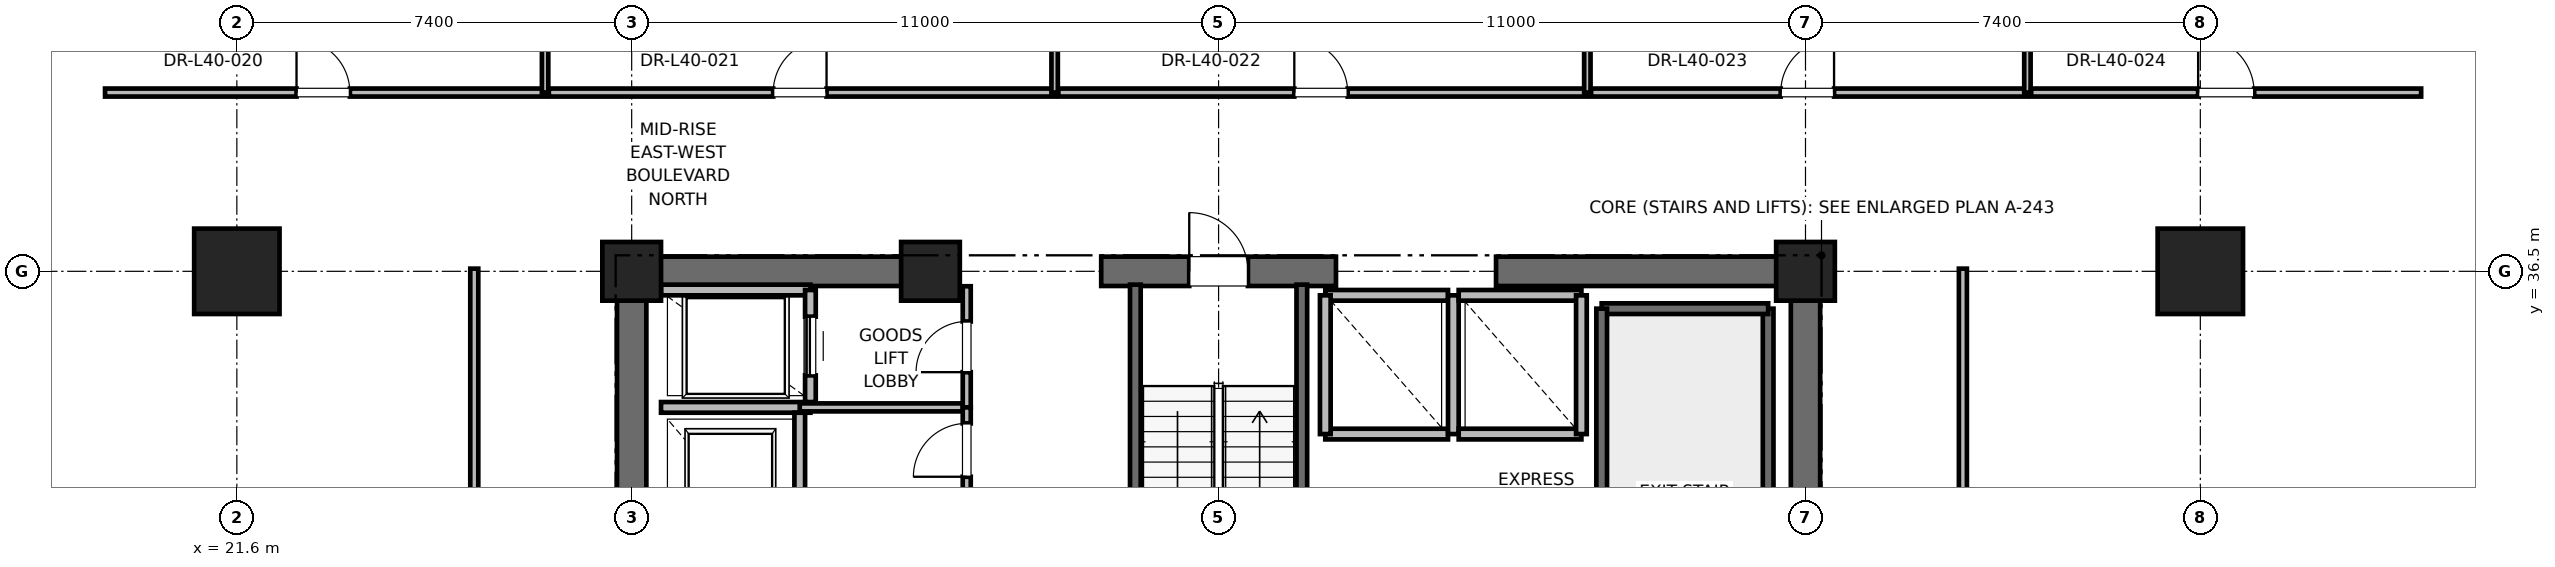
"""IFC4 building model, lengths in metres.
Left out: names, types, materials, properties, quantities, classifications, styles, units other than length and angle.
Written with IfcOpenShell. Run it as: python <this file> out.ifc"""

import sys

from ifc_helpers import new_model, si_unit, direction, frame, frame_2d, origin, origin_2d, place, context, subcontext, project, spatial, rectangle, extrude, element, fill, save


model = new_model("IFC4")
c1 = context("Model", 3, precision=1e-05, world=origin(), true_north=direction((0.0, 1.0)))
c2 = subcontext(c1, "Body", "Model", "MODEL_VIEW")
j1 = project(units=[si_unit("LENGTHUNIT", "METRE"), si_unit("PLANEANGLEUNIT", "RADIAN")], contexts=[c1])
p1 = place(None, origin())
s1 = spatial("IfcSite", under=j1, at=p1, CompositionType="ELEMENT")
p2 = place(p1, origin())
s2 = spatial("IfcBuilding", under=s1, at=p2, CompositionType="ELEMENT")
p3 = place(p2, frame((0.0, 0.0, 172.4)))
s3 = spatial("IfcBuildingStorey", under=s2, at=p3, CompositionType="ELEMENT", Elevation=172.4)
for number, where, z_axis, x_axis in (
    (1, (21.6, 36.5, 0.0), (0.0, 0.0, 1.0), (1.0, 0.0, 0.0)),
    (2, (58.4, 36.5, 0.0), (0.0, 0.0, 1.0), (1.0, 0.0, 0.0)),
):
    element("IfcColumn", number, at=place(p3, frame(where, z_axis=z_axis, x_axis=x_axis)), inside=s3, PredefinedType="COLUMN", context=c2, shape_type="SweptSolid", body=[
        extrude(rectangle(XDim=1.6, YDim=1.6, at=origin_2d()), origin(), (0.0, 0.0, 1.0), 4.0),
    ])
for number, where, z_axis, x_axis in (
    (3, (29.0, 36.5, 0.0), (0.0, 0.0, 1.0), (1.0, 0.0, 0.0)),
    (4, (51.0, 36.5, 0.0), (0.0, 0.0, 1.0), (1.0, 0.0, 0.0)),
    (5, (34.6, 36.5, 0.0), (0.0, 0.0, 1.0), (1.0, 0.0, 0.0)),
):
    element("IfcColumn", number, at=place(p3, frame(where, z_axis=z_axis, x_axis=x_axis)), inside=s3, PredefinedType="PILASTER", context=c2, shape_type="SweptSolid", body=[
        extrude(rectangle(XDim=1.1, YDim=1.1, at=origin_2d()), origin(), (0.0, 0.0, 1.0), 4.0),
    ])
p4 = place(p3, frame((29.0, 36.5, 0.0), z_axis=(0.0, 0.0, 1.0), x_axis=(1.0, 0.0, 0.0)))
e6 = element("IfcWall", 6, at=p4, inside=s3, PredefinedType="SHEAR", context=c2, shape_type="SweptSolid", body=[
    extrude(rectangle(XDim=5.8, YDim=0.55, at=frame_2d((2.9, 0.0))), origin(), (0.0, 0.0, 1.0), 3.775),
])
p5 = place(p3, frame((37.8, 36.5, 0.0), z_axis=(0.0, 0.0, 1.0), x_axis=(1.0, 0.0, 0.0)))
e7 = element("IfcWall", 7, at=p5, inside=s3, PredefinedType="SHEAR", context=c2, shape_type="SweptSolid", body=[
    extrude(rectangle(XDim=4.4, YDim=0.55, at=frame_2d((2.2, 0.0))), origin(), (0.0, 0.0, 1.0), 3.775),
])
p6 = place(p5, frame((1.65, 0.0, 0.0)))
e8 = element("IfcOpeningElement", 8, at=p6, cuts=e7, PredefinedType="OPENING", context=c2, shape_type="SweptSolid", body=[
    extrude(rectangle(XDim=1.1, YDim=2.15, at=frame_2d((0.55, 1.075))), frame((0.0, 0.275, 0.0), z_axis=(0.0, -1.0, 0.0), x_axis=(1.0, 0.0, 0.0)), (0.0, 0.0, 1.0), 0.55),
])
for number, where, z_axis, x_axis in (
    (9, (45.2, 36.5, 0.0), (0.0, 0.0, 1.0), (1.0, 0.0, 0.0)),
    (10, (29.0, 30.7, 0.0), (0.0, 0.0, 1.0), (0.0, 1.0, 0.0)),
):
    element("IfcWall", number, at=place(p3, frame(where, z_axis=z_axis, x_axis=x_axis)), inside=s3, PredefinedType="SHEAR", context=c2, shape_type="SweptSolid", body=[
        extrude(rectangle(XDim=5.8, YDim=0.55, at=frame_2d((2.9, 0.0))), origin(), (0.0, 0.0, 1.0), 3.775),
    ])
p7 = place(p3, frame((51.0, 27.7, 0.0), z_axis=(0.0, 0.0, 1.0), x_axis=(0.0, 1.0, 0.0)))
e11 = element("IfcWall", 11, at=p7, inside=s3, PredefinedType="SHEAR", context=c2, shape_type="SweptSolid", body=[
    extrude(rectangle(XDim=8.8, YDim=0.55, at=frame_2d((4.4, 0.0))), origin(), (0.0, 0.0, 1.0), 3.775),
])
p8 = place(p3, frame((50.3, 27.65, 0.0), z_axis=(0.0, 0.0, 1.0), x_axis=(0.0, 1.0, 0.0)))
e12 = element("IfcWall", 12, at=p8, inside=s3, PredefinedType="SOLIDWALL", context=c2, shape_type="SweptSolid", body=[
    extrude(rectangle(XDim=8.15, YDim=0.2, at=frame_2d((4.075, 0.0))), origin(), (0.0, 0.0, 1.0), 3.775),
])
p9 = place(p3, frame((47.18, 35.8, 0.0), z_axis=(0.0, 0.0, 1.0), x_axis=(1.0, 0.0, 0.0)))
e13 = element("IfcWall", 13, at=p9, inside=s3, PredefinedType="SOLIDWALL", context=c2, shape_type="SweptSolid", body=[
    extrude(rectangle(XDim=3.12, YDim=0.2, at=frame_2d((1.56, 0.0))), origin(), (0.0, 0.0, 1.0), 3.775),
])
p10 = place(p3, frame((47.18, 27.62, 0.0), z_axis=(0.0, 0.0, 1.0), x_axis=(0.0, 1.0, 0.0)))
e14 = element("IfcWall", 14, at=p10, inside=s3, PredefinedType="SOLIDWALL", context=c2, shape_type="SweptSolid", body=[
    extrude(rectangle(XDim=8.18, YDim=0.2, at=frame_2d((4.09, 0.0))), origin(), (0.0, 0.0, 1.0), 3.775),
])
p11 = place(p3, frame((38.44, 27.38, 0.0), z_axis=(0.0, 0.0, 1.0), x_axis=(0.0, 1.0, 0.0)))
e15 = element("IfcWall", 15, at=p11, inside=s3, PredefinedType="SOLIDWALL", context=c2, shape_type="SweptSolid", body=[
    extrude(rectangle(XDim=8.87, YDim=0.2, at=frame_2d((4.435, 0.0))), origin(), (0.0, 0.0, 1.0), 3.775),
])
p12 = place(p3, frame((41.56, 27.68, 0.0), z_axis=(0.0, 0.0, 1.0), x_axis=(0.0, 1.0, 0.0)))
e16 = element("IfcWall", 16, at=p12, inside=s3, PredefinedType="SOLIDWALL", context=c2, shape_type="SweptSolid", body=[
    extrude(rectangle(XDim=8.57, YDim=0.2, at=frame_2d((4.285, 0.0))), origin(), (0.0, 0.0, 1.0), 3.775),
])
p13 = place(p3, frame((29.55, 33.95, 0.0), z_axis=(0.0, 0.0, 1.0), x_axis=(1.0, 0.0, 0.0)))
e17 = element("IfcWall", 17, at=p13, inside=s3, PredefinedType="SOLIDWALL", context=c2, shape_type="SweptSolid", body=[
    extrude(rectangle(XDim=2.8, YDim=0.2, at=frame_2d((1.4, 0.0))), origin(), (0.0, 0.0, 1.0), 3.775),
])
p14 = place(p3, frame((32.15, 30.85, 0.0), z_axis=(0.0, 0.0, 1.0), x_axis=(0.0, 1.0, 0.0)))
e18 = element("IfcWall", 18, at=p14, inside=s3, PredefinedType="SOLIDWALL", context=c2, shape_type="SweptSolid", body=[
    extrude(rectangle(XDim=3.0, YDim=0.2, at=frame_2d((1.5, 0.0))), origin(), (0.0, 0.0, 1.0), 3.775),
])
p15 = place(p3, frame((32.35, 36.15, 0.0), z_axis=(0.0, 0.0, 1.0), x_axis=(-1.0, 0.0, 0.0)))
e19 = element("IfcWall", 19, at=p15, inside=s3, PredefinedType="SOLIDWALL", context=c2, shape_type="SweptSolid", body=[
    extrude(rectangle(XDim=2.8, YDim=0.2, at=frame_2d((1.4, 0.0))), origin(), (0.0, 0.0, 1.0), 2.985),
])
p16 = place(p3, frame((32.35, 34.05, 0.0), z_axis=(0.0, 0.0, 1.0), x_axis=(0.0, 1.0, 0.0)))
e20 = element("IfcWall", 20, at=p16, inside=s3, PredefinedType="SOLIDWALL", context=c2, shape_type="SweptSolid", body=[
    extrude(rectangle(XDim=2.1, YDim=0.2, at=frame_2d((1.05, 0.0))), origin(), (0.0, 0.0, 1.0), 3.775),
])
p17 = place(p16, frame((0.5, 0.0, 0.0)))
e21 = element("IfcOpeningElement", 21, at=p17, cuts=e20, PredefinedType="OPENING", context=c2, shape_type="SweptSolid", body=[
    extrude(rectangle(XDim=1.1, YDim=2.2, at=frame_2d((0.55, 1.1))), frame((0.0, 0.1, 0.0), z_axis=(0.0, -1.0, 0.0), x_axis=(1.0, 0.0, 0.0)), (0.0, 0.0, 1.0), 0.2),
])
p18 = place(p3, frame((42.0, 33.45, 0.0), z_axis=(0.0, 0.0, 1.0), x_axis=(1.0, 0.0, 0.0)))
e22 = element("IfcWall", 22, at=p18, inside=s3, PredefinedType="SOLIDWALL", context=c2, shape_type="SweptSolid", body=[
    extrude(rectangle(XDim=2.3, YDim=0.2, at=frame_2d((1.15, 0.0))), origin(), (0.0, 0.0, 1.0), 3.775),
])
p19 = place(p3, frame((44.3, 36.05, 0.0), z_axis=(0.0, 0.0, 1.0), x_axis=(-1.0, 0.0, 0.0)))
e23 = element("IfcWall", 23, at=p19, inside=s3, PredefinedType="SOLIDWALL", context=c2, shape_type="SweptSolid", body=[
    extrude(rectangle(XDim=2.3, YDim=0.2, at=frame_2d((1.15, 0.0))), origin(), (0.0, 0.0, 1.0), 2.755),
])
for number, where, z_axis, x_axis in (
    (24, (42.0, 36.05, 0.0), (0.0, 0.0, 1.0), (0.0, -1.0, 0.0)),
    (25, (44.4, 33.45, 0.0), (0.0, 0.0, 1.0), (0.0, 1.0, 0.0)),
):
    element("IfcWall", number, at=place(p3, frame(where, z_axis=z_axis, x_axis=x_axis)), inside=s3, PredefinedType="SOLIDWALL", context=c2, shape_type="SweptSolid", body=[
        extrude(rectangle(XDim=2.6, YDim=0.2, at=frame_2d((1.3, 0.0))), origin(), (0.0, 0.0, 1.0), 2.755),
    ])
p20 = place(p3, frame((44.5, 33.45, 0.0), z_axis=(0.0, 0.0, 1.0), x_axis=(1.0, 0.0, 0.0)))
e26 = element("IfcWall", 26, at=p20, inside=s3, PredefinedType="SOLIDWALL", context=c2, shape_type="SweptSolid", body=[
    extrude(rectangle(XDim=2.3, YDim=0.2, at=frame_2d((1.15, 0.0))), origin(), (0.0, 0.0, 1.0), 3.775),
])
p21 = place(p3, frame((46.8, 36.05, 0.0), z_axis=(0.0, 0.0, 1.0), x_axis=(-1.0, 0.0, 0.0)))
e27 = element("IfcWall", 27, at=p21, inside=s3, PredefinedType="SOLIDWALL", context=c2, shape_type="SweptSolid", body=[
    extrude(rectangle(XDim=2.3, YDim=0.2, at=frame_2d((1.15, 0.0))), origin(), (0.0, 0.0, 1.0), 2.755),
])
p22 = place(p3, frame((46.8, 33.45, 0.0), z_axis=(0.0, 0.0, 1.0), x_axis=(0.0, 1.0, 0.0)))
e28 = element("IfcWall", 28, at=p22, inside=s3, PredefinedType="SOLIDWALL", context=c2, shape_type="SweptSolid", body=[
    extrude(rectangle(XDim=2.6, YDim=0.2, at=frame_2d((1.3, 0.0))), origin(), (0.0, 0.0, 1.0), 3.775),
])
p23 = place(p3, frame((32.15, 33.95, 0.0), z_axis=(0.0, 0.0, 1.0), x_axis=(1.0, 0.0, 0.0)))
e29 = element("IfcWall", 29, at=p23, inside=s3, PredefinedType="PARTITIONING", context=c2, shape_type="SweptSolid", body=[
    extrude(rectangle(XDim=3.13, YDim=0.15, at=frame_2d((1.565, 0.0))), origin(), (0.0, 0.0, 1.0), 2.85),
])
p24 = place(p3, frame((35.28, 33.95, 0.0), z_axis=(0.0, 0.0, 1.0), x_axis=(0.0, 1.0, 0.0)))
e30 = element("IfcWall", 30, at=p24, inside=s3, PredefinedType="PARTITIONING", context=c2, shape_type="SweptSolid", body=[
    extrude(rectangle(XDim=2.27, YDim=0.15, at=frame_2d((1.135, 0.0))), origin(), (0.0, 0.0, 1.0), 2.755),
])
p25 = place(p24, frame((0.66, 0.0, 0.0)))
e31 = element("IfcOpeningElement", 31, at=p25, cuts=e30, PredefinedType="OPENING", context=c2, shape_type="SweptSolid", body=[
    extrude(rectangle(XDim=0.95, YDim=2.15, at=frame_2d((0.475, 1.075))), frame((0.0, 0.075, 0.0), z_axis=(0.0, -1.0, 0.0), x_axis=(1.0, 0.0, 0.0)), (0.0, 0.0, 1.0), 0.15),
])
p26 = place(p3, frame((35.28, 32.35, 0.0), z_axis=(0.0, 0.0, 1.0), x_axis=(0.0, 1.0, 0.0)))
e32 = element("IfcWall", 32, at=p26, inside=s3, PredefinedType="PARTITIONING", context=c2, shape_type="SweptSolid", body=[
    extrude(rectangle(XDim=1.6, YDim=0.15, at=frame_2d((0.8, 0.0))), origin(), (0.0, 0.0, 1.0), 2.85),
])
p27 = place(p26, frame((0.3, 0.0, 0.0)))
e33 = element("IfcOpeningElement", 33, at=p27, cuts=e32, PredefinedType="OPENING", context=c2, shape_type="SweptSolid", body=[
    extrude(rectangle(XDim=1.0, YDim=2.15, at=frame_2d((0.5, 1.075))), frame((0.0, 0.075, 0.0), z_axis=(0.0, -1.0, 0.0), x_axis=(1.0, 0.0, 0.0)), (0.0, 0.0, 1.0), 0.15),
])
p28 = place(p3, frame((19.13, 39.85, 0.0), z_axis=(0.0, 0.0, 1.0), x_axis=(1.0, 0.0, 0.0)))
e34 = element("IfcWall", 34, at=p28, inside=s3, PredefinedType="PARTITIONING", context=c2, shape_type="SweptSolid", body=[
    extrude(rectangle(XDim=8.248, YDim=0.15, at=frame_2d((4.124, 0.0))), origin(), (0.0, 0.0, 1.0), 2.85),
])
p29 = place(p28, frame((3.589, 0.0, 0.0)))
e35 = element("IfcOpeningElement", 35, at=p29, cuts=e34, PredefinedType="OPENING", context=c2, shape_type="SweptSolid", body=[
    extrude(rectangle(XDim=1.0, YDim=2.15, at=frame_2d((0.5, 1.075))), frame((0.0, 0.075, 0.0), z_axis=(0.0, -1.0, 0.0), x_axis=(1.0, 0.0, 0.0)), (0.0, 0.0, 1.0), 0.15),
])
p30 = place(p3, frame((27.377, 39.85, 0.0), z_axis=(0.0, 0.0, 1.0), x_axis=(0.0, 1.0, 0.0)))
e36 = element("IfcWall", 36, at=p30, inside=s3, PredefinedType="PARTITIONING", context=c2, shape_type="SweptSolid", body=[
    extrude(rectangle(XDim=9.339, YDim=0.12, at=frame_2d((4.669, 0.0))), origin(), (0.0, 0.0, 1.0), 2.85),
])
p31 = place(p3, frame((27.447, 39.85, 0.0), z_axis=(0.0, 0.0, 1.0), x_axis=(1.0, 0.0, 0.0)))
e37 = element("IfcWall", 37, at=p31, inside=s3, PredefinedType="PARTITIONING", context=c2, shape_type="SweptSolid", body=[
    extrude(rectangle(XDim=9.48, YDim=0.15, at=frame_2d((4.74, 0.0))), origin(), (0.0, 0.0, 1.0), 2.85),
])
p32 = place(p31, frame((4.205, 0.0, 0.0)))
e38 = element("IfcOpeningElement", 38, at=p32, cuts=e37, PredefinedType="OPENING", context=c2, shape_type="SweptSolid", body=[
    extrude(rectangle(XDim=1.0, YDim=2.15, at=frame_2d((0.5, 1.075))), frame((0.0, 0.075, 0.0), z_axis=(0.0, -1.0, 0.0), x_axis=(1.0, 0.0, 0.0)), (0.0, 0.0, 1.0), 0.15),
])
p33 = place(p3, frame((36.927, 39.85, 0.0), z_axis=(0.0, 0.0, 1.0), x_axis=(0.0, 1.0, 0.0)))
e39 = element("IfcWall", 39, at=p33, inside=s3, PredefinedType="PARTITIONING", context=c2, shape_type="SweptSolid", body=[
    extrude(rectangle(XDim=9.339, YDim=0.12, at=frame_2d((4.669, 0.0))), origin(), (0.0, 0.0, 1.0), 2.405),
])
p34 = place(p3, frame((36.997, 39.85, 0.0), z_axis=(0.0, 0.0, 1.0), x_axis=(1.0, 0.0, 0.0)))
e40 = element("IfcWall", 40, at=p34, inside=s3, PredefinedType="PARTITIONING", context=c2, shape_type="SweptSolid", body=[
    extrude(rectangle(XDim=9.914, YDim=0.15, at=frame_2d((4.957, 0.0))), origin(), (0.0, 0.0, 1.0), 2.85),
])
p35 = place(p34, frame((4.422, 0.0, 0.0)))
e41 = element("IfcOpeningElement", 41, at=p35, cuts=e40, PredefinedType="OPENING", context=c2, shape_type="SweptSolid", body=[
    extrude(rectangle(XDim=1.0, YDim=2.15, at=frame_2d((0.5, 1.075))), frame((0.0, 0.075, 0.0), z_axis=(0.0, -1.0, 0.0), x_axis=(1.0, 0.0, 0.0)), (0.0, 0.0, 1.0), 0.15),
])
p36 = place(p3, frame((46.911, 39.85, 0.0), z_axis=(0.0, 0.0, 1.0), x_axis=(0.0, 1.0, 0.0)))
e42 = element("IfcWall", 42, at=p36, inside=s3, PredefinedType="PARTITIONING", context=c2, shape_type="SweptSolid", body=[
    extrude(rectangle(XDim=9.339, YDim=0.12, at=frame_2d((4.669, 0.0))), origin(), (0.0, 0.0, 1.0), 2.405),
])
p37 = place(p3, frame((46.981, 39.85, 0.0), z_axis=(0.0, 0.0, 1.0), x_axis=(1.0, 0.0, 0.0)))
e43 = element("IfcWall", 43, at=p37, inside=s3, PredefinedType="PARTITIONING", context=c2, shape_type="SweptSolid", body=[
    extrude(rectangle(XDim=8.178, YDim=0.15, at=frame_2d((4.089, 0.0))), origin(), (0.0, 0.0, 1.0), 2.85),
])
p38 = place(p37, frame((3.554, 0.0, 0.0)))
e44 = element("IfcOpeningElement", 44, at=p38, cuts=e43, PredefinedType="OPENING", context=c2, shape_type="SweptSolid", body=[
    extrude(rectangle(XDim=1.0, YDim=2.15, at=frame_2d((0.5, 1.075))), frame((0.0, 0.075, 0.0), z_axis=(0.0, -1.0, 0.0), x_axis=(1.0, 0.0, 0.0)), (0.0, 0.0, 1.0), 0.15),
])
p39 = place(p3, frame((55.159, 39.85, 0.0), z_axis=(0.0, 0.0, 1.0), x_axis=(0.0, 1.0, 0.0)))
e45 = element("IfcWall", 45, at=p39, inside=s3, PredefinedType="PARTITIONING", context=c2, shape_type="SweptSolid", body=[
    extrude(rectangle(XDim=9.339, YDim=0.12, at=frame_2d((4.669, 0.0))), origin(), (0.0, 0.0, 1.0), 2.85),
])
p40 = place(p3, frame((55.229, 39.85, 0.0), z_axis=(0.0, 0.0, 1.0), x_axis=(1.0, 0.0, 0.0)))
e46 = element("IfcWall", 46, at=p40, inside=s3, PredefinedType="PARTITIONING", context=c2, shape_type="SweptSolid", body=[
    extrude(rectangle(XDim=7.31, YDim=0.15, at=frame_2d((3.655, 0.0))), origin(), (0.0, 0.0, 1.0), 2.85),
])
p41 = place(p40, frame((3.13, 0.0, 0.0)))
e47 = element("IfcOpeningElement", 47, at=p41, cuts=e46, PredefinedType="OPENING", context=c2, shape_type="SweptSolid", body=[
    extrude(rectangle(XDim=1.05, YDim=2.2, at=frame_2d((0.525, 1.1))), frame((0.0, 0.075, 0.0), z_axis=(0.0, -1.0, 0.0), x_axis=(1.0, 0.0, 0.0)), (0.0, 0.0, 1.0), 0.15),
])
p42 = place(p3, frame((26.05, 18.45, 0.0), z_axis=(0.0, 0.0, 1.0), x_axis=(0.0, 1.0, 0.0)))
e48 = element("IfcWall", 48, at=p42, inside=s3, PredefinedType="PARTITIONING", context=c2, shape_type="SweptSolid", body=[
    extrude(rectangle(XDim=18.1, YDim=0.15, at=frame_2d((9.05, 0.0))), origin(), (0.0, 0.0, 1.0), 2.85),
])
p43 = place(p42, frame((8.55, 0.0, 0.0)))
e49 = element("IfcOpeningElement", 49, at=p43, cuts=e48, PredefinedType="OPENING", context=c2, shape_type="SweptSolid", body=[
    extrude(rectangle(XDim=1.0, YDim=2.15, at=frame_2d((0.5, 1.075))), frame((0.0, 0.075, 0.0), z_axis=(0.0, -1.0, 0.0), x_axis=(1.0, 0.0, 0.0)), (0.0, 0.0, 1.0), 0.15),
])
p44 = place(p3, frame((53.95, 26.122, 0.0), z_axis=(0.0, 0.0, 1.0), x_axis=(0.0, 1.0, 0.0)))
e50 = element("IfcWall", 50, at=p44, inside=s3, PredefinedType="PARTITIONING", context=c2, shape_type="SweptSolid", body=[
    extrude(rectangle(XDim=10.428, YDim=0.15, at=frame_2d((5.214, 0.0))), origin(), (0.0, 0.0, 1.0), 2.85),
])
p45 = place(p44, frame((4.639, 0.0, 0.0)))
e51 = element("IfcOpeningElement", 51, at=p45, cuts=e50, PredefinedType="OPENING", context=c2, shape_type="SweptSolid", body=[
    extrude(rectangle(XDim=1.0, YDim=2.15, at=frame_2d((0.5, 1.075))), frame((0.0, 0.075, 0.0), z_axis=(0.0, -1.0, 0.0), x_axis=(1.0, 0.0, 0.0)), (0.0, 0.0, 1.0), 0.15),
])
p46 = place(p6, origin())
e52 = element("IfcDoor", 52, at=p46, inside=s3, OperationType="SINGLE_SWING_LEFT", PredefinedType="DOOR", context=c2, shape_type="SweptSolid", body=[
    extrude(rectangle(XDim=1.1, YDim=2.15, at=frame_2d((0.55, 1.075))), frame((0.0, 0.025, 0.0), z_axis=(0.0, -1.0, 0.0), x_axis=(1.0, 0.0, 0.0)), (0.0, 0.0, 1.0), 0.05),
])
fill(e8, e52)
p47 = place(p17, origin())
e53 = element("IfcDoor", 53, at=p47, inside=s3, OperationType="SLIDING_TO_RIGHT", PredefinedType="DOOR", context=c2, shape_type="SweptSolid", body=[
    extrude(rectangle(XDim=1.1, YDim=2.2, at=frame_2d((0.55, 1.1))), frame((0.0, 0.025, 0.0), z_axis=(0.0, -1.0, 0.0), x_axis=(1.0, 0.0, 0.0)), (0.0, 0.0, 1.0), 0.05),
])
fill(e21, e53)
p48 = place(p25, origin())
e54 = element("IfcDoor", 54, at=p48, inside=s3, OperationType="SINGLE_SWING_LEFT", PredefinedType="DOOR", context=c2, shape_type="SweptSolid", body=[
    extrude(rectangle(XDim=0.95, YDim=2.15, at=frame_2d((0.475, 1.075))), frame((0.0, 0.025, 0.0), z_axis=(0.0, -1.0, 0.0), x_axis=(1.0, 0.0, 0.0)), (0.0, 0.0, 1.0), 0.05),
])
fill(e31, e54)
p49 = place(p27, origin())
e55 = element("IfcDoor", 55, at=p49, inside=s3, OperationType="SINGLE_SWING_LEFT", PredefinedType="DOOR", context=c2, shape_type="SweptSolid", body=[
    extrude(rectangle(XDim=1.0, YDim=2.15, at=frame_2d((0.5, 1.075))), frame((0.0, 0.025, 0.0), z_axis=(0.0, -1.0, 0.0), x_axis=(1.0, 0.0, 0.0)), (0.0, 0.0, 1.0), 0.05),
])
fill(e33, e55)
p50 = place(p29, origin())
e56 = element("IfcDoor", 56, at=p50, inside=s3, OperationType="SINGLE_SWING_LEFT", PredefinedType="DOOR", context=c2, shape_type="SweptSolid", body=[
    extrude(rectangle(XDim=1.0, YDim=2.15, at=frame_2d((0.5, 1.075))), frame((0.0, 0.025, 0.0), z_axis=(0.0, -1.0, 0.0), x_axis=(1.0, 0.0, 0.0)), (0.0, 0.0, 1.0), 0.05),
])
fill(e35, e56)
p51 = place(p32, origin())
e57 = element("IfcDoor", 57, at=p51, inside=s3, OperationType="SINGLE_SWING_RIGHT", PredefinedType="DOOR", context=c2, shape_type="SweptSolid", body=[
    extrude(rectangle(XDim=1.0, YDim=2.15, at=frame_2d((0.5, 1.075))), frame((0.0, 0.025, 0.0), z_axis=(0.0, -1.0, 0.0), x_axis=(1.0, 0.0, 0.0)), (0.0, 0.0, 1.0), 0.05),
])
fill(e38, e57)
p52 = place(p35, origin())
e58 = element("IfcDoor", 58, at=p52, inside=s3, OperationType="SINGLE_SWING_LEFT", PredefinedType="DOOR", context=c2, shape_type="SweptSolid", body=[
    extrude(rectangle(XDim=1.0, YDim=2.15, at=frame_2d((0.5, 1.075))), frame((0.0, 0.025, 0.0), z_axis=(0.0, -1.0, 0.0), x_axis=(1.0, 0.0, 0.0)), (0.0, 0.0, 1.0), 0.05),
])
fill(e41, e58)
p53 = place(p38, origin())
e59 = element("IfcDoor", 59, at=p53, inside=s3, OperationType="SINGLE_SWING_RIGHT", PredefinedType="DOOR", context=c2, shape_type="SweptSolid", body=[
    extrude(rectangle(XDim=1.0, YDim=2.15, at=frame_2d((0.5, 1.075))), frame((0.0, 0.025, 0.0), z_axis=(0.0, -1.0, 0.0), x_axis=(1.0, 0.0, 0.0)), (0.0, 0.0, 1.0), 0.05),
])
fill(e44, e59)
p54 = place(p41, origin())
e60 = element("IfcDoor", 60, at=p54, inside=s3, OperationType="SINGLE_SWING_LEFT", PredefinedType="DOOR", context=c2, shape_type="SweptSolid", body=[
    extrude(rectangle(XDim=1.05, YDim=2.2, at=frame_2d((0.525, 1.1))), frame((0.0, 0.025, 0.0), z_axis=(0.0, -1.0, 0.0), x_axis=(1.0, 0.0, 0.0)), (0.0, 0.0, 1.0), 0.05),
])
fill(e47, e60)
save(model, sys.argv[1])
